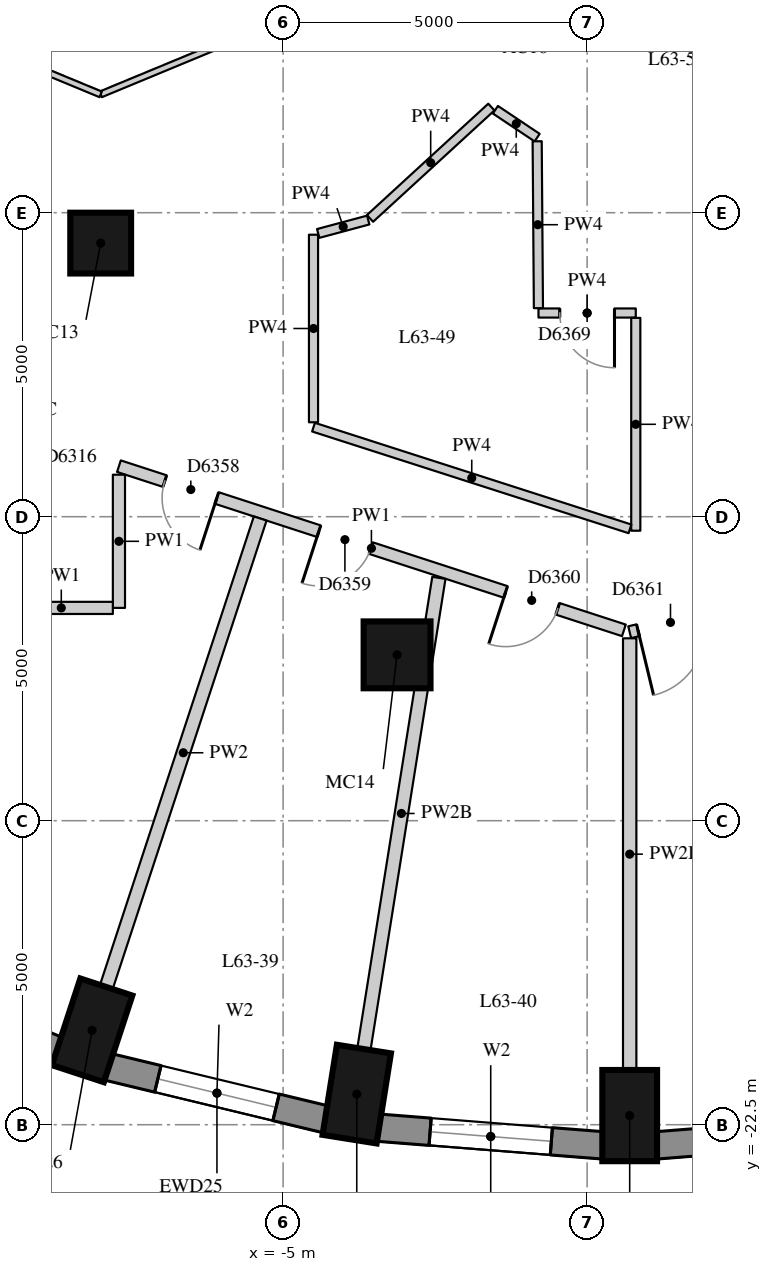
"""IFC4 building model, lengths in metres.
Left out: names, types, materials, properties, quantities, classifications, styles, units other than length and angle.
Written with IfcOpenShell. Run it as: python <this file> out.ifc"""

import sys

from ifc_helpers import new_model, si_unit, direction, frame, frame_2d, origin, origin_2d, place, context, subcontext, project, spatial, rectangle, extrude, element, fill, save


model = new_model("IFC4")
c1 = context("Model", 3, precision=1e-05, world=origin(), true_north=direction((0.0, 1.0)))
c2 = subcontext(c1, "Body", "Model", "MODEL_VIEW")
j1 = project(units=[si_unit("LENGTHUNIT", "METRE"), si_unit("PLANEANGLEUNIT", "RADIAN")], contexts=[c1])
p1 = place(None, origin())
s1 = spatial("IfcSite", under=j1, at=p1, CompositionType="ELEMENT")
p2 = place(p1, origin())
s2 = spatial("IfcBuilding", under=s1, at=p2, CompositionType="ELEMENT")
p3 = place(p2, frame((0.0, 0.0, 222.2)))
s3 = spatial("IfcBuildingStorey", under=s2, at=p3, CompositionType="ELEMENT", Elevation=222.2)
for number, where, z_axis, x_axis in (
    (1, (-8.141, -20.948, 0.0), (0.0, 0.0, 1.0), (-0.312, -0.95, 0.0)),
    (2, (-3.789, -21.997, 0.0), (0.0, 0.0, 1.0), (-0.157, -0.988, 0.0)),
    (3, (0.7, -22.35, 0.0), (0.0, 0.0, 1.0), (0.0, -1.0, 0.0)),
):
    element("IfcColumn", number, at=place(p3, frame(where, z_axis=z_axis, x_axis=x_axis)), inside=s3, PredefinedType="COLUMN", context=c2, shape_type="SweptSolid", body=[
        extrude(rectangle(XDim=1.5, YDim=0.9, at=origin_2d()), origin(), (0.0, 0.0, 1.0), 3.3),
    ])
p4 = place(p3, frame((-8.0, -8.0, 0.0), z_axis=(0.0, 0.0, 1.0), x_axis=(1.0, 0.0, 0.0)))
e4 = element("IfcColumn", 4, at=p4, inside=s3, PredefinedType="COLUMN", context=c2, shape_type="SweptSolid", body=[
    extrude(rectangle(XDim=1.0, YDim=1.0, at=origin_2d()), origin(), (0.0, 0.0, 1.0), 3.3),
])
p5 = place(p3, frame((-3.126, -14.772, 0.0), z_axis=(0.0, 0.0, 1.0), x_axis=(1.0, 0.0, 0.0)))
e5 = element("IfcColumn", 5, at=p5, inside=s3, PredefinedType="COLUMN", context=c2, shape_type="SweptSolid", body=[
    extrude(rectangle(XDim=1.1, YDim=1.1, at=origin_2d()), origin(), (0.0, 0.0, 1.0), 3.3),
])
p6 = place(p3, frame((-12.069, -19.867, 0.0), z_axis=(0.0, 0.0, 1.0), x_axis=(0.922168222612, -0.386789050006, 0.0)))
e6 = element("IfcWall", 6, at=p6, inside=s3, PredefinedType="SOLIDWALL", context=c2, shape_type="SweptSolid", body=[
    extrude(rectangle(XDim=3.651, YDim=0.45, at=frame_2d((1.825, 0.0))), origin(), (0.0, 0.0, 1.0), 3.02),
])
p7 = place(p6, frame((0.825, 0.0, 0.4)))
e7 = element("IfcOpeningElement", 7, at=p7, cuts=e6, PredefinedType="OPENING", context=c2, shape_type="SweptSolid", body=[
    extrude(rectangle(XDim=2.0, YDim=1.75, at=frame_2d((1.0, 0.875))), frame((0.0, 0.235, 0.0), z_axis=(0.0, -1.0, 0.0), x_axis=(1.0, 0.0, 0.0)), (0.0, 0.0, 1.0), 0.47),
])
p8 = place(p3, frame((-7.885, -21.547, 0.0), z_axis=(0.0, 0.0, 1.0), x_axis=(0.9721584944, -0.234324266275, 0.0)))
e8 = element("IfcWall", 8, at=p8, inside=s3, PredefinedType="SOLIDWALL", context=c2, shape_type="SweptSolid", body=[
    extrude(rectangle(XDim=3.698, YDim=0.45, at=frame_2d((1.849, 0.0))), origin(), (0.0, 0.0, 1.0), 3.02),
])
p9 = place(p8, frame((0.849, 0.0, 0.4)))
e9 = element("IfcOpeningElement", 9, at=p9, cuts=e8, PredefinedType="OPENING", context=c2, shape_type="SweptSolid", body=[
    extrude(rectangle(XDim=2.0, YDim=1.75, at=frame_2d((1.0, 0.875))), frame((0.0, 0.235, 0.0), z_axis=(0.0, -1.0, 0.0), x_axis=(1.0, 0.0, 0.0)), (0.0, 0.0, 1.0), 0.47),
])
p10 = place(p3, frame((-3.441, -22.548, 0.0), z_axis=(0.0, 0.0, 1.0), x_axis=(0.996913971077, -0.078501810629, 0.0)))
e10 = element("IfcWall", 10, at=p10, inside=s3, PredefinedType="SOLIDWALL", context=c2, shape_type="SweptSolid", body=[
    extrude(rectangle(XDim=3.723, YDim=0.45, at=frame_2d((1.861, 0.0))), origin(), (0.0, 0.0, 1.0), 3.02),
])
p11 = place(p10, frame((0.861, 0.0, 0.4)))
e11 = element("IfcOpeningElement", 11, at=p11, cuts=e10, PredefinedType="OPENING", context=c2, shape_type="SweptSolid", body=[
    extrude(rectangle(XDim=2.0, YDim=1.75, at=frame_2d((1.0, 0.875))), frame((0.0, 0.235, 0.0), z_axis=(0.0, -1.0, 0.0), x_axis=(1.0, 0.0, 0.0)), (0.0, 0.0, 1.0), 0.47),
])
p12 = place(p3, frame((1.13, -22.841, 0.0), z_axis=(0.0, 0.0, 1.0), x_axis=(0.996913566885, 0.078506943392, 0.0)))
e12 = element("IfcWall", 12, at=p12, inside=s3, PredefinedType="SOLIDWALL", context=c2, shape_type="SweptSolid", body=[
    extrude(rectangle(XDim=3.722, YDim=0.45, at=frame_2d((1.861, 0.0))), origin(), (0.0, 0.0, 1.0), 3.02),
])
p13 = place(p12, frame((0.861, 0.0, 0.4)))
e13 = element("IfcOpeningElement", 13, at=p13, cuts=e12, PredefinedType="OPENING", context=c2, shape_type="SweptSolid", body=[
    extrude(rectangle(XDim=2.0, YDim=1.75, at=frame_2d((1.0, 0.875))), frame((0.0, 0.235, 0.0), z_axis=(0.0, -1.0, 0.0), x_axis=(1.0, 0.0, 0.0)), (0.0, 0.0, 1.0), 0.47),
])
p14 = place(p3, frame((9.922, -12.183, 0.0), z_axis=(0.0, 0.0, 1.0), x_axis=(-0.972292362394, -0.233768180104, 0.0)))
e14 = element("IfcWall", 14, at=p14, inside=s3, PredefinedType="PARTITIONING", context=c2, shape_type="SweptSolid", body=[
    extrude(rectangle(XDim=9.485, YDim=0.2, at=frame_2d((4.742, 0.0))), origin(), (0.0, 0.0, 1.0), 2.42),
])
p15 = place(p14, frame((8.245, 0.0, 0.0)))
e15 = element("IfcOpeningElement", 15, at=p15, cuts=e14, PredefinedType="OPENING", context=c2, shape_type="SweptSolid", body=[
    extrude(rectangle(XDim=1.1, YDim=2.1, at=frame_2d((0.55, 1.05))), frame((0.0, 0.11, 0.0), z_axis=(0.0, -1.0, 0.0), x_axis=(1.0, 0.0, 0.0)), (0.0, 0.0, 1.0), 0.22),
])
p16 = place(p3, frame((0.605, -14.369, 0.0), z_axis=(0.0, 0.0, 1.0), x_axis=(-0.950994614205, 0.309207444529, 0.0)))
e16 = element("IfcWall", 16, at=p16, inside=s3, PredefinedType="PARTITIONING", context=c2, shape_type="SweptSolid", body=[
    extrude(rectangle(XDim=8.733, YDim=0.2, at=frame_2d((4.366, 0.0))), origin(), (0.0, 0.0, 1.0), 3.02),
])
p17 = place(p16, frame((7.04, 0.0, 0.0)))
e17 = element("IfcOpeningElement", 17, at=p17, cuts=e16, PredefinedType="OPENING", context=c2, shape_type="SweptSolid", body=[
    extrude(rectangle(XDim=0.9, YDim=2.1, at=frame_2d((0.45, 1.05))), frame((0.0, 0.11, 0.0), z_axis=(0.0, -1.0, 0.0), x_axis=(1.0, 0.0, 0.0)), (0.0, 0.0, 1.0), 0.22),
])
p18 = place(p16, frame((4.375, 0.0, 0.0)))
e18 = element("IfcOpeningElement", 18, at=p18, cuts=e16, PredefinedType="OPENING", context=c2, shape_type="SweptSolid", body=[
    extrude(rectangle(XDim=0.9, YDim=2.1, at=frame_2d((0.45, 1.05))), frame((0.0, 0.11, 0.0), z_axis=(0.0, -1.0, 0.0), x_axis=(1.0, 0.0, 0.0)), (0.0, 0.0, 1.0), 0.22),
])
p19 = place(p16, frame((1.145, 0.0, 0.0)))
e19 = element("IfcOpeningElement", 19, at=p19, cuts=e16, PredefinedType="OPENING", context=c2, shape_type="SweptSolid", body=[
    extrude(rectangle(XDim=0.9, YDim=2.1, at=frame_2d((0.45, 1.05))), frame((0.0, 0.11, 0.0), z_axis=(0.0, -1.0, 0.0), x_axis=(1.0, 0.0, 0.0)), (0.0, 0.0, 1.0), 0.22),
])
p20 = place(p3, frame((-7.7, -11.809, 0.0), z_axis=(0.0, 0.0, 1.0), x_axis=(0.0, -1.0, 0.0)))
e20 = element("IfcWall", 20, at=p20, inside=s3, PredefinedType="PARTITIONING", context=c2, shape_type="SweptSolid", body=[
    extrude(rectangle(XDim=2.191, YDim=0.2, at=frame_2d((1.095, 0.0))), origin(), (0.0, 0.0, 1.0), 3.02),
])
p21 = place(p3, frame((-7.8, -14.0, 0.0), z_axis=(0.0, 0.0, 1.0), x_axis=(-1.0, 0.0, 0.0)))
e21 = element("IfcWall", 21, at=p21, inside=s3, PredefinedType="PARTITIONING", context=c2, shape_type="SweptSolid", body=[
    extrude(rectangle(XDim=1.696, YDim=0.2, at=frame_2d((0.848, 0.0))), origin(), (0.0, 0.0, 1.0), 3.02),
])
p22 = place(p3, frame((-0.8, -9.15, 0.0), z_axis=(0.0, 0.0, 1.0), x_axis=(1.0, 0.0, 0.0)))
e22 = element("IfcWall", 22, at=p22, inside=s3, PredefinedType="PARTITIONING", context=c2, shape_type="SweptSolid", body=[
    extrude(rectangle(XDim=1.6, YDim=0.15, at=frame_2d((0.8, 0.0))), origin(), (0.0, 0.0, 1.0), 3.02),
])
p23 = place(p22, frame((0.35, 0.0, 0.0)))
e23 = element("IfcOpeningElement", 23, at=p23, cuts=e22, PredefinedType="OPENING", context=c2, shape_type="SweptSolid", body=[
    extrude(rectangle(XDim=0.9, YDim=2.1, at=frame_2d((0.45, 1.05))), frame((0.0, 0.085, 0.0), z_axis=(0.0, -1.0, 0.0), x_axis=(1.0, 0.0, 0.0)), (0.0, 0.0, 1.0), 0.17),
])
p24 = place(p3, frame((0.8, -9.23, 0.0), z_axis=(0.0, 0.0, 1.0), x_axis=(0.0, -1.0, 0.0)))
e24 = element("IfcWall", 24, at=p24, inside=s3, PredefinedType="PARTITIONING", context=c2, shape_type="SweptSolid", body=[
    extrude(rectangle(XDim=3.5, YDim=0.15, at=frame_2d((1.75, 0.0))), origin(), (0.0, 0.0, 1.0), 3.02),
])
p25 = place(p3, frame((0.705, -12.7, 0.0), z_axis=(0.0, 0.0, 1.0), x_axis=(-0.952035530576, 0.305987497327, 0.0)))
e25 = element("IfcWall", 25, at=p25, inside=s3, PredefinedType="PARTITIONING", context=c2, shape_type="SweptSolid", body=[
    extrude(rectangle(XDim=5.467, YDim=0.15, at=frame_2d((2.733, 0.0))), origin(), (0.0, 0.0, 1.0), 3.02),
])
p26 = place(p3, frame((-4.5, -10.947, 0.0), z_axis=(0.0, 0.0, 1.0), x_axis=(0.0, 1.0, 0.0)))
e26 = element("IfcWall", 26, at=p26, inside=s3, PredefinedType="PARTITIONING", context=c2, shape_type="SweptSolid", body=[
    extrude(rectangle(XDim=3.085, YDim=0.15, at=frame_2d((1.542, 0.0))), origin(), (0.0, 0.0, 1.0), 3.02),
])
p27 = place(p3, frame((-4.423, -7.842, 0.0), z_axis=(0.0, 0.0, 1.0), x_axis=(0.965853333569, 0.259089440221, 0.0)))
e27 = element("IfcWall", 27, at=p27, inside=s3, PredefinedType="PARTITIONING", context=c2, shape_type="SweptSolid", body=[
    extrude(rectangle(XDim=0.852, YDim=0.15, at=frame_2d((0.426, 0.0))), origin(), (0.0, 0.0, 1.0), 3.02),
])
p28 = place(p3, frame((-3.571, -7.594, 0.0), z_axis=(0.0, 0.0, 1.0), x_axis=(0.736783660812, 0.676128565555, 0.0)))
e28 = element("IfcWall", 28, at=p28, inside=s3, PredefinedType="PARTITIONING", context=c2, shape_type="SweptSolid", body=[
    extrude(rectangle(XDim=2.709, YDim=0.15, at=frame_2d((1.354, 0.0))), origin(), (0.0, 0.0, 1.0), 3.02),
])
p29 = place(p3, frame((-1.509, -5.806, 0.0), z_axis=(0.0, 0.0, 1.0), x_axis=(0.831367153095, -0.55572354346, 0.0)))
e29 = element("IfcWall", 29, at=p29, inside=s3, PredefinedType="PARTITIONING", context=c2, shape_type="SweptSolid", body=[
    extrude(rectangle(XDim=0.825, YDim=0.15, at=frame_2d((0.413, 0.0))), origin(), (0.0, 0.0, 1.0), 3.02),
])
p30 = place(p3, frame((-0.822, -6.325, 0.0), z_axis=(0.0, 0.0, 1.0), x_axis=(0.007471771501, -0.999972085926, 0.0)))
e30 = element("IfcWall", 30, at=p30, inside=s3, PredefinedType="PARTITIONING", context=c2, shape_type="SweptSolid", body=[
    extrude(rectangle(XDim=2.745, YDim=0.15, at=frame_2d((1.372, 0.0))), origin(), (0.0, 0.0, 1.0), 3.02),
])
p31 = place(p3, frame((-7.907, -20.235, 0.0), z_axis=(0.0, 0.0, 1.0), x_axis=(0.311998426629, 0.950082618397, 0.0)))
e31 = element("IfcWall", 31, at=p31, inside=s3, PredefinedType="PARTITIONING", context=c2, shape_type="SweptSolid", body=[
    extrude(rectangle(XDim=8.111, YDim=0.22, at=frame_2d((4.055, 0.0))), origin(), (0.0, 0.0, 1.0), 3.02),
])
p32 = place(p3, frame((-3.671, -21.256, 0.0), z_axis=(0.0, 0.0, 1.0), x_axis=(0.1571047049, 0.98758195189, 0.0)))
e32 = element("IfcWall", 32, at=p32, inside=s3, PredefinedType="PARTITIONING", context=c2, shape_type="SweptSolid", body=[
    extrude(rectangle(XDim=7.848, YDim=0.22, at=frame_2d((3.924, 0.0))), origin(), (0.0, 0.0, 1.0), 2.57),
])
p33 = place(p3, frame((0.7, -21.6, 0.0), z_axis=(0.0, 0.0, 1.0), x_axis=(0.0, 1.0, 0.0)))
e33 = element("IfcWall", 33, at=p33, inside=s3, PredefinedType="PARTITIONING", context=c2, shape_type="SweptSolid", body=[
    extrude(rectangle(XDim=7.1, YDim=0.22, at=frame_2d((3.55, 0.0))), origin(), (0.0, 0.0, 1.0), 2.57),
])
for number, where, z_axis, x_axis in (
    (34, (-4.073, -3.927, 0.0), (0.0, 0.0, 1.0), (-0.924, -0.383, 0.0)),
    (35, (-8.0, -5.554, 0.0), (0.0, 0.0, 1.0), (-0.924, 0.383, 0.0)),
):
    element("IfcWall", number, at=place(p3, frame(where, z_axis=z_axis, x_axis=x_axis)), inside=s3, PredefinedType="PARTITIONING", context=c2, shape_type="SweptSolid", body=[
        extrude(rectangle(XDim=4.251, YDim=0.1, at=frame_2d((2.125, 0.0))), origin(), (0.0, 0.0, 1.0), 3.02),
    ])
p34 = place(p9, origin())
e36 = element("IfcWindow", 36, at=p34, inside=s3, PartitioningType="SINGLE_PANEL", PredefinedType="WINDOW", context=c2, shape_type="SweptSolid", body=[
    extrude(rectangle(XDim=2.0, YDim=1.75, at=frame_2d((1.0, 0.875))), frame((0.0, 0.035, 0.0), z_axis=(0.0, -1.0, 0.0), x_axis=(1.0, 0.0, 0.0)), (0.0, 0.0, 1.0), 0.06),
])
fill(e9, e36)
p35 = place(p11, origin())
e37 = element("IfcWindow", 37, at=p35, inside=s3, PartitioningType="SINGLE_PANEL", PredefinedType="WINDOW", context=c2, shape_type="SweptSolid", body=[
    extrude(rectangle(XDim=2.0, YDim=1.75, at=frame_2d((1.0, 0.875))), frame((0.0, 0.035, 0.0), z_axis=(0.0, -1.0, 0.0), x_axis=(1.0, 0.0, 0.0)), (0.0, 0.0, 1.0), 0.06),
])
fill(e11, e37)
p36 = place(p17, origin())
e38 = element("IfcDoor", 38, at=p36, inside=s3, OperationType="SINGLE_SWING_LEFT", PredefinedType="DOOR", context=c2, shape_type="SweptSolid", body=[
    extrude(rectangle(XDim=0.9, YDim=2.1, at=frame_2d((0.45, 1.05))), frame((0.0, 0.025, 0.0), z_axis=(0.0, -1.0, 0.0), x_axis=(1.0, 0.0, 0.0)), (0.0, 0.0, 1.0), 0.05),
])
fill(e17, e38)
p37 = place(p18, origin())
e39 = element("IfcDoor", 39, at=p37, inside=s3, OperationType="SINGLE_SWING_RIGHT", PredefinedType="DOOR", context=c2, shape_type="SweptSolid", body=[
    extrude(rectangle(XDim=0.9, YDim=2.1, at=frame_2d((0.45, 1.05))), frame((0.0, 0.025, 0.0), z_axis=(0.0, -1.0, 0.0), x_axis=(1.0, 0.0, 0.0)), (0.0, 0.0, 1.0), 0.05),
])
fill(e18, e39)
p38 = place(p19, origin())
e40 = element("IfcDoor", 40, at=p38, inside=s3, OperationType="SINGLE_SWING_RIGHT", PredefinedType="DOOR", context=c2, shape_type="SweptSolid", body=[
    extrude(rectangle(XDim=0.9, YDim=2.1, at=frame_2d((0.45, 1.05))), frame((0.0, 0.025, 0.0), z_axis=(0.0, -1.0, 0.0), x_axis=(1.0, 0.0, 0.0)), (0.0, 0.0, 1.0), 0.05),
])
fill(e19, e40)
p39 = place(p15, origin())
e41 = element("IfcDoor", 41, at=p39, inside=s3, OperationType="SINGLE_SWING_RIGHT", PredefinedType="DOOR", context=c2, shape_type="SweptSolid", body=[
    extrude(rectangle(XDim=1.1, YDim=2.1, at=frame_2d((0.55, 1.05))), frame((0.0, 0.025, 0.0), z_axis=(0.0, -1.0, 0.0), x_axis=(1.0, 0.0, 0.0)), (0.0, 0.0, 1.0), 0.05),
])
fill(e15, e41)
p40 = place(p23, origin())
e42 = element("IfcDoor", 42, at=p40, inside=s3, OperationType="SINGLE_SWING_LEFT", PredefinedType="DOOR", context=c2, shape_type="SweptSolid", body=[
    extrude(rectangle(XDim=0.9, YDim=2.1, at=frame_2d((0.45, 1.05))), frame((0.0, 0.025, 0.0), z_axis=(0.0, -1.0, 0.0), x_axis=(1.0, 0.0, 0.0)), (0.0, 0.0, 1.0), 0.05),
])
fill(e23, e42)
save(model, sys.argv[1])
